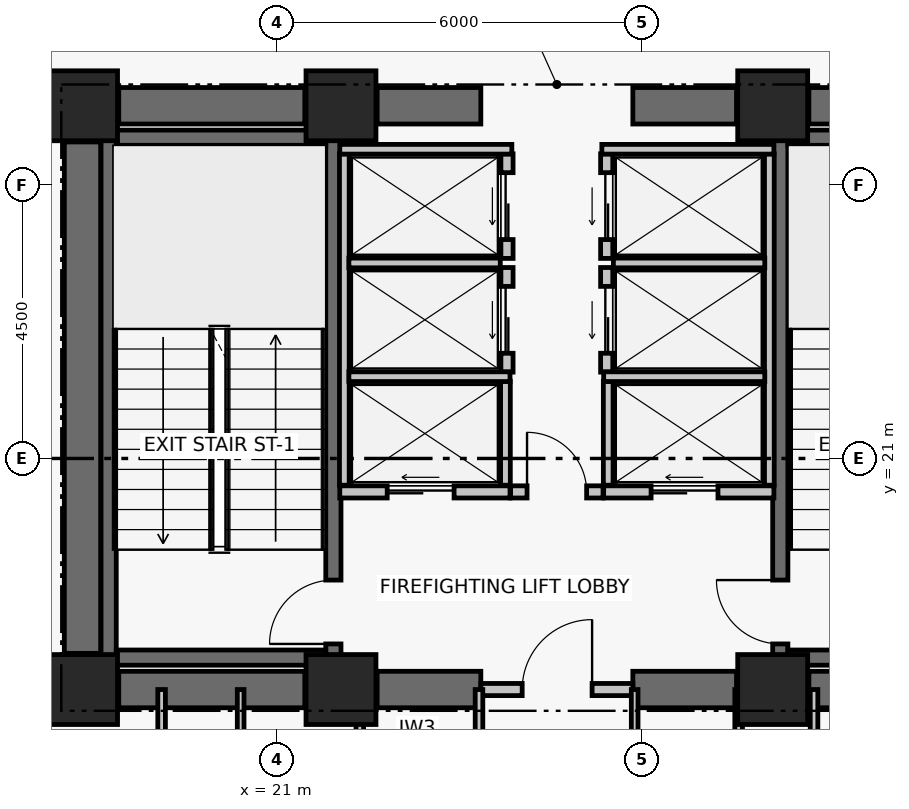
"""IFC4 building model, lengths in metres.
Left out: names, types, materials, properties, quantities, classifications, styles, units other than length and angle.
Written with IfcOpenShell. Run it as: python <this file> out.ifc"""

import sys

from ifc_helpers import new_model, si_unit, direction, frame, frame_2d, origin, origin_2d, place, context, subcontext, project, spatial, rectangle, extrude, element, fill, save


model = new_model("IFC4")
c1 = context("Model", 3, precision=1e-05, world=origin(), true_north=direction((0.0, 1.0)))
c2 = subcontext(c1, "Body", "Model", "MODEL_VIEW")
j1 = project(units=[si_unit("LENGTHUNIT", "METRE"), si_unit("PLANEANGLEUNIT", "RADIAN")], contexts=[c1])
p1 = place(None, origin())
s1 = spatial("IfcSite", under=j1, at=p1, CompositionType="ELEMENT")
p2 = place(p1, origin())
s2 = spatial("IfcBuilding", under=s1, at=p2, CompositionType="ELEMENT")
p3 = place(p2, frame((0.0, 0.0, 27.6)))
s3 = spatial("IfcBuildingStorey", under=s2, at=p3, CompositionType="ELEMENT", Elevation=27.6)
for number, where, z_axis, x_axis in (
    (1, (17.8, 17.2, 0.0), (0.0, 0.0, 1.0), (1.0, 0.0, 0.0)),
    (2, (22.05, 17.2, 0.0), (0.0, 0.0, 1.0), (1.0, 0.0, 0.0)),
    (3, (29.15, 17.2, 0.0), (0.0, 0.0, 1.0), (1.0, 0.0, 0.0)),
    (4, (17.8, 26.8, 0.0), (0.0, 0.0, 1.0), (1.0, 0.0, 0.0)),
    (5, (22.05, 26.8, 0.0), (0.0, 0.0, 1.0), (1.0, 0.0, 0.0)),
    (6, (29.15, 26.8, 0.0), (0.0, 0.0, 1.0), (1.0, 0.0, 0.0)),
):
    element("IfcColumn", number, at=place(p3, frame(where, z_axis=z_axis, x_axis=x_axis)), inside=s3, PredefinedType="COLUMN", context=c2, shape_type="SweptSolid", body=[
        extrude(rectangle(XDim=1.15, YDim=1.15, at=origin_2d()), origin(), (0.0, 0.0, 1.0), 3.72),
    ])
p4 = place(p3, frame((18.395, 17.2, 0.0), z_axis=(0.0, 0.0, 1.0), x_axis=(1.0, 0.0, 0.0)))
e7 = element("IfcWall", 7, at=p4, inside=s3, PredefinedType="SHEAR", context=c2, shape_type="SweptSolid", body=[
    extrude(rectangle(XDim=3.06, YDim=0.6, at=frame_2d((1.53, 0.0))), origin(), (0.0, 0.0, 1.0), 3.47),
])
p5 = place(p3, frame((22.645, 17.2, 0.0), z_axis=(0.0, 0.0, 1.0), x_axis=(1.0, 0.0, 0.0)))
e8 = element("IfcWall", 8, at=p5, inside=s3, PredefinedType="SHEAR", context=c2, shape_type="SweptSolid", body=[
    extrude(rectangle(XDim=1.705, YDim=0.6, at=frame_2d((0.853, 0.0))), origin(), (0.0, 0.0, 1.0), 3.47),
])
p6 = place(p3, frame((26.85, 17.2, 0.0), z_axis=(0.0, 0.0, 1.0), x_axis=(1.0, 0.0, 0.0)))
e9 = element("IfcWall", 9, at=p6, inside=s3, PredefinedType="SHEAR", context=c2, shape_type="SweptSolid", body=[
    extrude(rectangle(XDim=1.705, YDim=0.6, at=frame_2d((0.853, 0.0))), origin(), (0.0, 0.0, 1.0), 3.47),
])
p7 = place(p3, frame((29.745, 17.2, 0.0), z_axis=(0.0, 0.0, 1.0), x_axis=(1.0, 0.0, 0.0)))
e10 = element("IfcWall", 10, at=p7, inside=s3, PredefinedType="SHEAR", context=c2, shape_type="SweptSolid", body=[
    extrude(rectangle(XDim=3.06, YDim=0.6, at=frame_2d((1.53, 0.0))), origin(), (0.0, 0.0, 1.0), 3.47),
])
p8 = place(p3, frame((18.395, 26.8, 0.0), z_axis=(0.0, 0.0, 1.0), x_axis=(1.0, 0.0, 0.0)))
e11 = element("IfcWall", 11, at=p8, inside=s3, PredefinedType="SHEAR", context=c2, shape_type="SweptSolid", body=[
    extrude(rectangle(XDim=3.06, YDim=0.6, at=frame_2d((1.53, 0.0))), origin(), (0.0, 0.0, 1.0), 3.47),
])
p9 = place(p3, frame((22.645, 26.8, 0.0), z_axis=(0.0, 0.0, 1.0), x_axis=(1.0, 0.0, 0.0)))
e12 = element("IfcWall", 12, at=p9, inside=s3, PredefinedType="SHEAR", context=c2, shape_type="SweptSolid", body=[
    extrude(rectangle(XDim=1.705, YDim=0.6, at=frame_2d((0.853, 0.0))), origin(), (0.0, 0.0, 1.0), 3.47),
])
p10 = place(p3, frame((26.85, 26.8, 0.0), z_axis=(0.0, 0.0, 1.0), x_axis=(1.0, 0.0, 0.0)))
e13 = element("IfcWall", 13, at=p10, inside=s3, PredefinedType="SHEAR", context=c2, shape_type="SweptSolid", body=[
    extrude(rectangle(XDim=1.705, YDim=0.6, at=frame_2d((0.853, 0.0))), origin(), (0.0, 0.0, 1.0), 3.47),
])
p11 = place(p3, frame((29.745, 26.8, 0.0), z_axis=(0.0, 0.0, 1.0), x_axis=(1.0, 0.0, 0.0)))
e14 = element("IfcWall", 14, at=p11, inside=s3, PredefinedType="SHEAR", context=c2, shape_type="SweptSolid", body=[
    extrude(rectangle(XDim=3.06, YDim=0.6, at=frame_2d((1.53, 0.0))), origin(), (0.0, 0.0, 1.0), 3.47),
])
p12 = place(p3, frame((17.8, 17.795, 0.0), z_axis=(0.0, 0.0, 1.0), x_axis=(0.0, 1.0, 0.0)))
e15 = element("IfcWall", 15, at=p12, inside=s3, PredefinedType="SHEAR", context=c2, shape_type="SweptSolid", body=[
    extrude(rectangle(XDim=8.41, YDim=0.6, at=frame_2d((4.205, 0.0))), origin(), (0.0, 0.0, 1.0), 3.47),
])
p13 = place(p3, frame((18.229, 17.6, 0.0), z_axis=(0.0, 0.0, 1.0), x_axis=(0.0, 1.0, 0.0)))
e16 = element("IfcWall", 16, at=p13, inside=s3, PredefinedType="SHEAR", context=c2, shape_type="SweptSolid", body=[
    extrude(rectangle(XDim=8.8, YDim=0.25, at=frame_2d((4.4, 0.0))), origin(), (0.0, 0.0, 1.0), 3.47),
])
p14 = place(p3, frame((21.925, 17.6, 0.0), z_axis=(0.0, 0.0, 1.0), x_axis=(0.0, 1.0, 0.0)))
e17 = element("IfcWall", 17, at=p14, inside=s3, PredefinedType="SHEAR", context=c2, shape_type="SweptSolid", body=[
    extrude(rectangle(XDim=8.8, YDim=0.25, at=frame_2d((4.4, 0.0))), origin(), (0.0, 0.0, 1.0), 3.47),
])
p15 = place(p14, frame((0.35, 0.0, 0.0)))
e18 = element("IfcOpeningElement", 18, at=p15, cuts=e17, PredefinedType="OPENING", context=c2, shape_type="SweptSolid", body=[
    extrude(rectangle(XDim=1.05, YDim=2.08, at=frame_2d((0.525, 1.04))), frame((0.0, 0.135, 0.0), z_axis=(0.0, -1.0, 0.0), x_axis=(1.0, 0.0, 0.0)), (0.0, 0.0, 1.0), 0.27),
])
for number, where, z_axis, x_axis in (
    (19, (18.354, 17.725, 0.0), (0.0, 0.0, 1.0), (1.0, 0.0, 0.0)),
    (20, (18.354, 26.275, 0.0), (0.0, 0.0, 1.0), (1.0, 0.0, 0.0)),
):
    element("IfcWall", number, at=place(p3, frame(where, z_axis=z_axis, x_axis=x_axis)), inside=s3, PredefinedType="SHEAR", context=c2, shape_type="SweptSolid", body=[
        extrude(rectangle(XDim=3.446, YDim=0.25, at=frame_2d((1.723, 0.0))), origin(), (0.0, 0.0, 1.0), 3.47),
    ])
p16 = place(p3, frame((29.275, 17.6, 0.0), z_axis=(0.0, 0.0, 1.0), x_axis=(0.0, 1.0, 0.0)))
e21 = element("IfcWall", 21, at=p16, inside=s3, PredefinedType="SHEAR", context=c2, shape_type="SweptSolid", body=[
    extrude(rectangle(XDim=8.8, YDim=0.25, at=frame_2d((4.4, 0.0))), origin(), (0.0, 0.0, 1.0), 3.47),
])
p17 = place(p16, frame((0.35, 0.0, 0.0)))
e22 = element("IfcOpeningElement", 22, at=p17, cuts=e21, PredefinedType="OPENING", context=c2, shape_type="SweptSolid", body=[
    extrude(rectangle(XDim=1.05, YDim=2.08, at=frame_2d((0.525, 1.04))), frame((0.0, 0.135, 0.0), z_axis=(0.0, -1.0, 0.0), x_axis=(1.0, 0.0, 0.0)), (0.0, 0.0, 1.0), 0.27),
])
for number, where, z_axis, x_axis in (
    (23, (29.4, 17.725, 0.0), (0.0, 0.0, 1.0), (1.0, 0.0, 0.0)),
    (24, (29.4, 26.275, 0.0), (0.0, 0.0, 1.0), (1.0, 0.0, 0.0)),
):
    element("IfcWall", number, at=place(p3, frame(where, z_axis=z_axis, x_axis=x_axis)), inside=s3, PredefinedType="SHEAR", context=c2, shape_type="SweptSolid", body=[
        extrude(rectangle(XDim=3.446, YDim=0.25, at=frame_2d((1.723, 0.0))), origin(), (0.0, 0.0, 1.0), 3.47),
    ])
p18 = place(p3, frame((24.35, 17.2, 0.0), z_axis=(0.0, 0.0, 1.0), x_axis=(1.0, 0.0, 0.0)))
e25 = element("IfcWall", 25, at=p18, inside=s3, PredefinedType="PARTITIONING", context=c2, shape_type="SweptSolid", body=[
    extrude(rectangle(XDim=2.5, YDim=0.2, at=frame_2d((1.25, 0.0))), origin(), (0.0, 0.0, 1.0), 2.6),
])
p19 = place(p18, frame((0.68, 0.0, 0.0)))
e26 = element("IfcOpeningElement", 26, at=p19, cuts=e25, PredefinedType="OPENING", context=c2, shape_type="SweptSolid", body=[
    extrude(rectangle(XDim=1.15, YDim=2.08, at=frame_2d((0.575, 1.04))), frame((0.0, 0.11, 0.0), z_axis=(0.0, -1.0, 0.0), x_axis=(1.0, 0.0, 0.0)), (0.0, 0.0, 1.0), 0.22),
])
p20 = place(p3, frame((24.84, 20.45, 0.0), z_axis=(0.0, 0.0, 1.0), x_axis=(1.0, 0.0, 0.0)))
e27 = element("IfcWall", 27, at=p20, inside=s3, PredefinedType="PARTITIONING", context=c2, shape_type="SweptSolid", body=[
    extrude(rectangle(XDim=1.52, YDim=0.2, at=frame_2d((0.76, 0.0))), origin(), (0.0, 0.0, 1.0), 3.47),
])
p21 = place(p20, frame((0.27, 0.0, 0.0)))
e28 = element("IfcOpeningElement", 28, at=p21, cuts=e27, PredefinedType="OPENING", context=c2, shape_type="SweptSolid", body=[
    extrude(rectangle(XDim=0.98, YDim=2.06, at=frame_2d((0.49, 1.03))), frame((0.0, 0.11, 0.0), z_axis=(0.0, -1.0, 0.0), x_axis=(1.0, 0.0, 0.0)), (0.0, 0.0, 1.0), 0.22),
])
p22 = place(p3, frame((22.03, 20.45, 0.0), z_axis=(0.0, 0.0, 1.0), x_axis=(1.0, 0.0, 0.0)))
e29 = element("IfcWall", 29, at=p22, inside=s3, PredefinedType="PARTITIONING", context=c2, shape_type="SweptSolid", body=[
    extrude(rectangle(XDim=2.8, YDim=0.2, at=frame_2d((1.4, 0.0))), origin(), (0.0, 0.0, 1.0), 3.47),
])
p23 = place(p22, frame((0.78, 0.0, 0.0)))
e30 = element("IfcOpeningElement", 30, at=p23, cuts=e29, PredefinedType="OPENING", context=c2, shape_type="SweptSolid", body=[
    extrude(rectangle(XDim=1.1, YDim=2.08, at=frame_2d((0.55, 1.04))), frame((0.0, 0.11, 0.0), z_axis=(0.0, -1.0, 0.0), x_axis=(1.0, 0.0, 0.0)), (0.0, 0.0, 1.0), 0.22),
])
p24 = place(p3, frame((26.37, 20.45, 0.0), z_axis=(0.0, 0.0, 1.0), x_axis=(1.0, 0.0, 0.0)))
e31 = element("IfcWall", 31, at=p24, inside=s3, PredefinedType="PARTITIONING", context=c2, shape_type="SweptSolid", body=[
    extrude(rectangle(XDim=2.8, YDim=0.2, at=frame_2d((1.4, 0.0))), origin(), (0.0, 0.0, 1.0), 3.47),
])
p25 = place(p24, frame((0.78, 0.0, 0.0)))
e32 = element("IfcOpeningElement", 32, at=p25, cuts=e31, PredefinedType="OPENING", context=c2, shape_type="SweptSolid", body=[
    extrude(rectangle(XDim=1.1, YDim=2.08, at=frame_2d((0.55, 1.04))), frame((0.0, 0.11, 0.0), z_axis=(0.0, -1.0, 0.0), x_axis=(1.0, 0.0, 0.0)), (0.0, 0.0, 1.0), 0.22),
])
p26 = place(p3, frame((24.78, 22.42, 0.0), z_axis=(0.0, 0.0, 1.0), x_axis=(0.0, 1.0, 0.0)))
e33 = element("IfcWall", 33, at=p26, inside=s3, PredefinedType="PARTITIONING", context=c2, shape_type="SweptSolid", body=[
    extrude(rectangle(XDim=1.72, YDim=0.2, at=frame_2d((0.86, 0.0))), origin(), (0.0, 0.0, 1.0), 3.47),
])
p27 = place(p26, frame((0.31, 0.0, 0.0)))
e34 = element("IfcOpeningElement", 34, at=p27, cuts=e33, PredefinedType="OPENING", context=c2, shape_type="SweptSolid", body=[
    extrude(rectangle(XDim=1.1, YDim=2.08, at=frame_2d((0.55, 1.04))), frame((0.0, 0.11, 0.0), z_axis=(0.0, -1.0, 0.0), x_axis=(1.0, 0.0, 0.0)), (0.0, 0.0, 1.0), 0.22),
])
p28 = place(p3, frame((24.78, 24.29, 0.0), z_axis=(0.0, 0.0, 1.0), x_axis=(0.0, 1.0, 0.0)))
e35 = element("IfcWall", 35, at=p28, inside=s3, PredefinedType="PARTITIONING", context=c2, shape_type="SweptSolid", body=[
    extrude(rectangle(XDim=1.72, YDim=0.2, at=frame_2d((0.86, 0.0))), origin(), (0.0, 0.0, 1.0), 3.47),
])
p29 = place(p28, frame((0.31, 0.0, 0.0)))
e36 = element("IfcOpeningElement", 36, at=p29, cuts=e35, PredefinedType="OPENING", context=c2, shape_type="SweptSolid", body=[
    extrude(rectangle(XDim=1.1, YDim=2.08, at=frame_2d((0.55, 1.04))), frame((0.0, 0.11, 0.0), z_axis=(0.0, -1.0, 0.0), x_axis=(1.0, 0.0, 0.0)), (0.0, 0.0, 1.0), 0.22),
])
p30 = place(p3, frame((26.42, 22.42, 0.0), z_axis=(0.0, 0.0, 1.0), x_axis=(0.0, 1.0, 0.0)))
e37 = element("IfcWall", 37, at=p30, inside=s3, PredefinedType="PARTITIONING", context=c2, shape_type="SweptSolid", body=[
    extrude(rectangle(XDim=1.72, YDim=0.2, at=frame_2d((0.86, 0.0))), origin(), (0.0, 0.0, 1.0), 3.47),
])
p31 = place(p30, frame((0.31, 0.0, 0.0)))
e38 = element("IfcOpeningElement", 38, at=p31, cuts=e37, PredefinedType="OPENING", context=c2, shape_type="SweptSolid", body=[
    extrude(rectangle(XDim=1.1, YDim=2.08, at=frame_2d((0.55, 1.04))), frame((0.0, 0.11, 0.0), z_axis=(0.0, -1.0, 0.0), x_axis=(1.0, 0.0, 0.0)), (0.0, 0.0, 1.0), 0.22),
])
p32 = place(p3, frame((26.42, 24.29, 0.0), z_axis=(0.0, 0.0, 1.0), x_axis=(0.0, 1.0, 0.0)))
e39 = element("IfcWall", 39, at=p32, inside=s3, PredefinedType="PARTITIONING", context=c2, shape_type="SweptSolid", body=[
    extrude(rectangle(XDim=1.72, YDim=0.2, at=frame_2d((0.86, 0.0))), origin(), (0.0, 0.0, 1.0), 3.47),
])
p33 = place(p32, frame((0.31, 0.0, 0.0)))
e40 = element("IfcOpeningElement", 40, at=p33, cuts=e39, PredefinedType="OPENING", context=c2, shape_type="SweptSolid", body=[
    extrude(rectangle(XDim=1.1, YDim=2.08, at=frame_2d((0.55, 1.04))), frame((0.0, 0.11, 0.0), z_axis=(0.0, -1.0, 0.0), x_axis=(1.0, 0.0, 0.0)), (0.0, 0.0, 1.0), 0.22),
])
p34 = place(p3, frame((22.105, 20.56, 0.0), z_axis=(0.0, 0.0, 1.0), x_axis=(0.0, 1.0, 0.0)))
e41 = element("IfcWall", 41, at=p34, inside=s3, PredefinedType="PARTITIONING", context=c2, shape_type="SweptSolid", body=[
    extrude(rectangle(XDim=5.45, YDim=0.16, at=frame_2d((2.725, 0.0))), origin(), (0.0, 0.0, 1.0), 3.47),
])
p35 = place(p3, frame((24.755, 20.56, 0.0), z_axis=(0.0, 0.0, 1.0), x_axis=(0.0, 1.0, 0.0)))
e42 = element("IfcWall", 42, at=p35, inside=s3, PredefinedType="PARTITIONING", context=c2, shape_type="SweptSolid", body=[
    extrude(rectangle(XDim=1.71, YDim=0.16, at=frame_2d((0.855, 0.0))), origin(), (0.0, 0.0, 1.0), 3.47),
])
p36 = place(p3, frame((22.18, 22.345, 0.0), z_axis=(0.0, 0.0, 1.0), x_axis=(1.0, 0.0, 0.0)))
e43 = element("IfcWall", 43, at=p36, inside=s3, PredefinedType="PARTITIONING", context=c2, shape_type="SweptSolid", body=[
    extrude(rectangle(XDim=2.65, YDim=0.16, at=frame_2d((1.325, 0.0))), origin(), (0.0, 0.0, 1.0), 3.47),
])
p37 = place(p3, frame((22.18, 24.215, 0.0), z_axis=(0.0, 0.0, 1.0), x_axis=(1.0, 0.0, 0.0)))
e44 = element("IfcWall", 44, at=p37, inside=s3, PredefinedType="PARTITIONING", context=c2, shape_type="SweptSolid", body=[
    extrude(rectangle(XDim=2.49, YDim=0.16, at=frame_2d((1.245, 0.0))), origin(), (0.0, 0.0, 1.0), 3.47),
])
p38 = place(p3, frame((22.03, 26.085, 0.0), z_axis=(0.0, 0.0, 1.0), x_axis=(1.0, 0.0, 0.0)))
e45 = element("IfcWall", 45, at=p38, inside=s3, PredefinedType="PARTITIONING", context=c2, shape_type="SweptSolid", body=[
    extrude(rectangle(XDim=2.83, YDim=0.16, at=frame_2d((1.415, 0.0))), origin(), (0.0, 0.0, 1.0), 3.47),
])
p39 = place(p3, frame((29.095, 20.56, 0.0), z_axis=(0.0, 0.0, 1.0), x_axis=(0.0, 1.0, 0.0)))
e46 = element("IfcWall", 46, at=p39, inside=s3, PredefinedType="PARTITIONING", context=c2, shape_type="SweptSolid", body=[
    extrude(rectangle(XDim=5.45, YDim=0.16, at=frame_2d((2.725, 0.0))), origin(), (0.0, 0.0, 1.0), 3.47),
])
p40 = place(p3, frame((26.445, 20.56, 0.0), z_axis=(0.0, 0.0, 1.0), x_axis=(0.0, 1.0, 0.0)))
e47 = element("IfcWall", 47, at=p40, inside=s3, PredefinedType="PARTITIONING", context=c2, shape_type="SweptSolid", body=[
    extrude(rectangle(XDim=1.71, YDim=0.16, at=frame_2d((0.855, 0.0))), origin(), (0.0, 0.0, 1.0), 3.47),
])
p41 = place(p3, frame((26.37, 22.345, 0.0), z_axis=(0.0, 0.0, 1.0), x_axis=(1.0, 0.0, 0.0)))
e48 = element("IfcWall", 48, at=p41, inside=s3, PredefinedType="PARTITIONING", context=c2, shape_type="SweptSolid", body=[
    extrude(rectangle(XDim=2.65, YDim=0.16, at=frame_2d((1.325, 0.0))), origin(), (0.0, 0.0, 1.0), 3.47),
])
p42 = place(p3, frame((26.53, 24.215, 0.0), z_axis=(0.0, 0.0, 1.0), x_axis=(1.0, 0.0, 0.0)))
e49 = element("IfcWall", 49, at=p42, inside=s3, PredefinedType="PARTITIONING", context=c2, shape_type="SweptSolid", body=[
    extrude(rectangle(XDim=2.49, YDim=0.16, at=frame_2d((1.245, 0.0))), origin(), (0.0, 0.0, 1.0), 3.47),
])
p43 = place(p3, frame((26.34, 26.085, 0.0), z_axis=(0.0, 0.0, 1.0), x_axis=(1.0, 0.0, 0.0)))
e50 = element("IfcWall", 50, at=p43, inside=s3, PredefinedType="PARTITIONING", context=c2, shape_type="SweptSolid", body=[
    extrude(rectangle(XDim=2.83, YDim=0.16, at=frame_2d((1.415, 0.0))), origin(), (0.0, 0.0, 1.0), 3.47),
])
p44 = place(p3, frame((19.1, 14.95, 0.0), z_axis=(0.0, 0.0, 1.0), x_axis=(0.0, 1.0, 0.0)))
e51 = element("IfcWall", 51, at=p44, inside=s3, PredefinedType="PARTITIONING", context=c2, shape_type="SweptSolid", body=[
    extrude(rectangle(XDim=2.25, YDim=0.125, at=frame_2d((1.125, 0.0))), origin(), (0.0, 0.0, 1.0), 2.6),
])
p45 = place(p3, frame((20.4, 14.95, 0.0), z_axis=(0.0, 0.0, 1.0), x_axis=(0.0, 1.0, 0.0)))
e52 = element("IfcWall", 52, at=p45, inside=s3, PredefinedType="PARTITIONING", context=c2, shape_type="SweptSolid", body=[
    extrude(rectangle(XDim=2.25, YDim=0.11, at=frame_2d((1.125, 0.0))), origin(), (0.0, 0.0, 1.0), 2.6),
])
for number, where, z_axis, x_axis in (
    (53, (22.36, 14.95, 0.0), (0.0, 0.0, 1.0), (0.0, 1.0, 0.0)),
    (54, (24.32, 14.95, 0.0), (0.0, 0.0, 1.0), (0.0, 1.0, 0.0)),
):
    element("IfcWall", number, at=place(p3, frame(where, z_axis=z_axis, x_axis=x_axis)), inside=s3, PredefinedType="PARTITIONING", context=c2, shape_type="SweptSolid", body=[
        extrude(rectangle(XDim=2.25, YDim=0.125, at=frame_2d((1.125, 0.0))), origin(), (0.0, 0.0, 1.0), 2.6),
    ])
p46 = place(p3, frame((26.88, 14.95, 0.0), z_axis=(0.0, 0.0, 1.0), x_axis=(0.0, 1.0, 0.0)))
e55 = element("IfcWall", 55, at=p46, inside=s3, PredefinedType="PARTITIONING", context=c2, shape_type="SweptSolid", body=[
    extrude(rectangle(XDim=2.25, YDim=0.11, at=frame_2d((1.125, 0.0))), origin(), (0.0, 0.0, 1.0), 2.6),
])
for number, where, z_axis, x_axis in (
    (56, (28.59, 14.95, 0.0), (0.0, 0.0, 1.0), (0.0, 1.0, 0.0)),
    (57, (29.83, 14.95, 0.0), (0.0, 0.0, 1.0), (0.0, 1.0, 0.0)),
):
    element("IfcWall", number, at=place(p3, frame(where, z_axis=z_axis, x_axis=x_axis)), inside=s3, PredefinedType="PARTITIONING", context=c2, shape_type="SweptSolid", body=[
        extrude(rectangle(XDim=2.25, YDim=0.125, at=frame_2d((1.125, 0.0))), origin(), (0.0, 0.0, 1.0), 2.6),
    ])
p47 = place(p15, origin())
e58 = element("IfcDoor", 58, at=p47, inside=s3, OperationType="SINGLE_SWING_LEFT", PredefinedType="DOOR", context=c2, shape_type="SweptSolid", body=[
    extrude(rectangle(XDim=1.05, YDim=2.08, at=frame_2d((0.525, 1.04))), frame((0.0, 0.025, 0.0), z_axis=(0.0, -1.0, 0.0), x_axis=(1.0, 0.0, 0.0)), (0.0, 0.0, 1.0), 0.05),
])
fill(e18, e58)
p48 = place(p17, origin())
e59 = element("IfcDoor", 59, at=p48, inside=s3, OperationType="SINGLE_SWING_RIGHT", PredefinedType="DOOR", context=c2, shape_type="SweptSolid", body=[
    extrude(rectangle(XDim=1.05, YDim=2.08, at=frame_2d((0.525, 1.04))), frame((0.0, 0.025, 0.0), z_axis=(0.0, -1.0, 0.0), x_axis=(1.0, 0.0, 0.0)), (0.0, 0.0, 1.0), 0.05),
])
fill(e22, e59)
p49 = place(p19, origin())
e60 = element("IfcDoor", 60, at=p49, inside=s3, OperationType="SINGLE_SWING_RIGHT", PredefinedType="DOOR", context=c2, shape_type="SweptSolid", body=[
    extrude(rectangle(XDim=1.15, YDim=2.08, at=frame_2d((0.575, 1.04))), frame((0.0, 0.025, 0.0), z_axis=(0.0, -1.0, 0.0), x_axis=(1.0, 0.0, 0.0)), (0.0, 0.0, 1.0), 0.05),
])
fill(e26, e60)
p50 = place(p21, origin())
e61 = element("IfcDoor", 61, at=p50, inside=s3, OperationType="SINGLE_SWING_LEFT", PredefinedType="DOOR", context=c2, shape_type="SweptSolid", body=[
    extrude(rectangle(XDim=0.98, YDim=2.06, at=frame_2d((0.49, 1.03))), frame((0.0, 0.025, 0.0), z_axis=(0.0, -1.0, 0.0), x_axis=(1.0, 0.0, 0.0)), (0.0, 0.0, 1.0), 0.05),
])
fill(e28, e61)
p51 = place(p23, origin())
e62 = element("IfcDoor", 62, at=p51, inside=s3, OperationType="DOUBLE_DOOR_SLIDING", PredefinedType="DOOR", context=c2, shape_type="SweptSolid", body=[
    extrude(rectangle(XDim=1.1, YDim=2.08, at=frame_2d((0.55, 1.04))), frame((0.0, 0.025, 0.0), z_axis=(0.0, -1.0, 0.0), x_axis=(1.0, 0.0, 0.0)), (0.0, 0.0, 1.0), 0.05),
])
fill(e30, e62)
p52 = place(p25, origin())
e63 = element("IfcDoor", 63, at=p52, inside=s3, OperationType="DOUBLE_DOOR_SLIDING", PredefinedType="DOOR", context=c2, shape_type="SweptSolid", body=[
    extrude(rectangle(XDim=1.1, YDim=2.08, at=frame_2d((0.55, 1.04))), frame((0.0, 0.025, 0.0), z_axis=(0.0, -1.0, 0.0), x_axis=(1.0, 0.0, 0.0)), (0.0, 0.0, 1.0), 0.05),
])
fill(e32, e63)
p53 = place(p27, origin())
e64 = element("IfcDoor", 64, at=p53, inside=s3, OperationType="DOUBLE_DOOR_SLIDING", PredefinedType="DOOR", context=c2, shape_type="SweptSolid", body=[
    extrude(rectangle(XDim=1.1, YDim=2.08, at=frame_2d((0.55, 1.04))), frame((0.0, 0.025, 0.0), z_axis=(0.0, -1.0, 0.0), x_axis=(1.0, 0.0, 0.0)), (0.0, 0.0, 1.0), 0.05),
])
fill(e34, e64)
p54 = place(p29, origin())
e65 = element("IfcDoor", 65, at=p54, inside=s3, OperationType="DOUBLE_DOOR_SLIDING", PredefinedType="DOOR", context=c2, shape_type="SweptSolid", body=[
    extrude(rectangle(XDim=1.1, YDim=2.08, at=frame_2d((0.55, 1.04))), frame((0.0, 0.025, 0.0), z_axis=(0.0, -1.0, 0.0), x_axis=(1.0, 0.0, 0.0)), (0.0, 0.0, 1.0), 0.05),
])
fill(e36, e65)
p55 = place(p31, origin())
e66 = element("IfcDoor", 66, at=p55, inside=s3, OperationType="DOUBLE_DOOR_SLIDING", PredefinedType="DOOR", context=c2, shape_type="SweptSolid", body=[
    extrude(rectangle(XDim=1.1, YDim=2.08, at=frame_2d((0.55, 1.04))), frame((0.0, 0.025, 0.0), z_axis=(0.0, -1.0, 0.0), x_axis=(1.0, 0.0, 0.0)), (0.0, 0.0, 1.0), 0.05),
])
fill(e38, e66)
p56 = place(p33, origin())
e67 = element("IfcDoor", 67, at=p56, inside=s3, OperationType="DOUBLE_DOOR_SLIDING", PredefinedType="DOOR", context=c2, shape_type="SweptSolid", body=[
    extrude(rectangle(XDim=1.1, YDim=2.08, at=frame_2d((0.55, 1.04))), frame((0.0, 0.025, 0.0), z_axis=(0.0, -1.0, 0.0), x_axis=(1.0, 0.0, 0.0)), (0.0, 0.0, 1.0), 0.05),
])
fill(e40, e67)
save(model, sys.argv[1])
